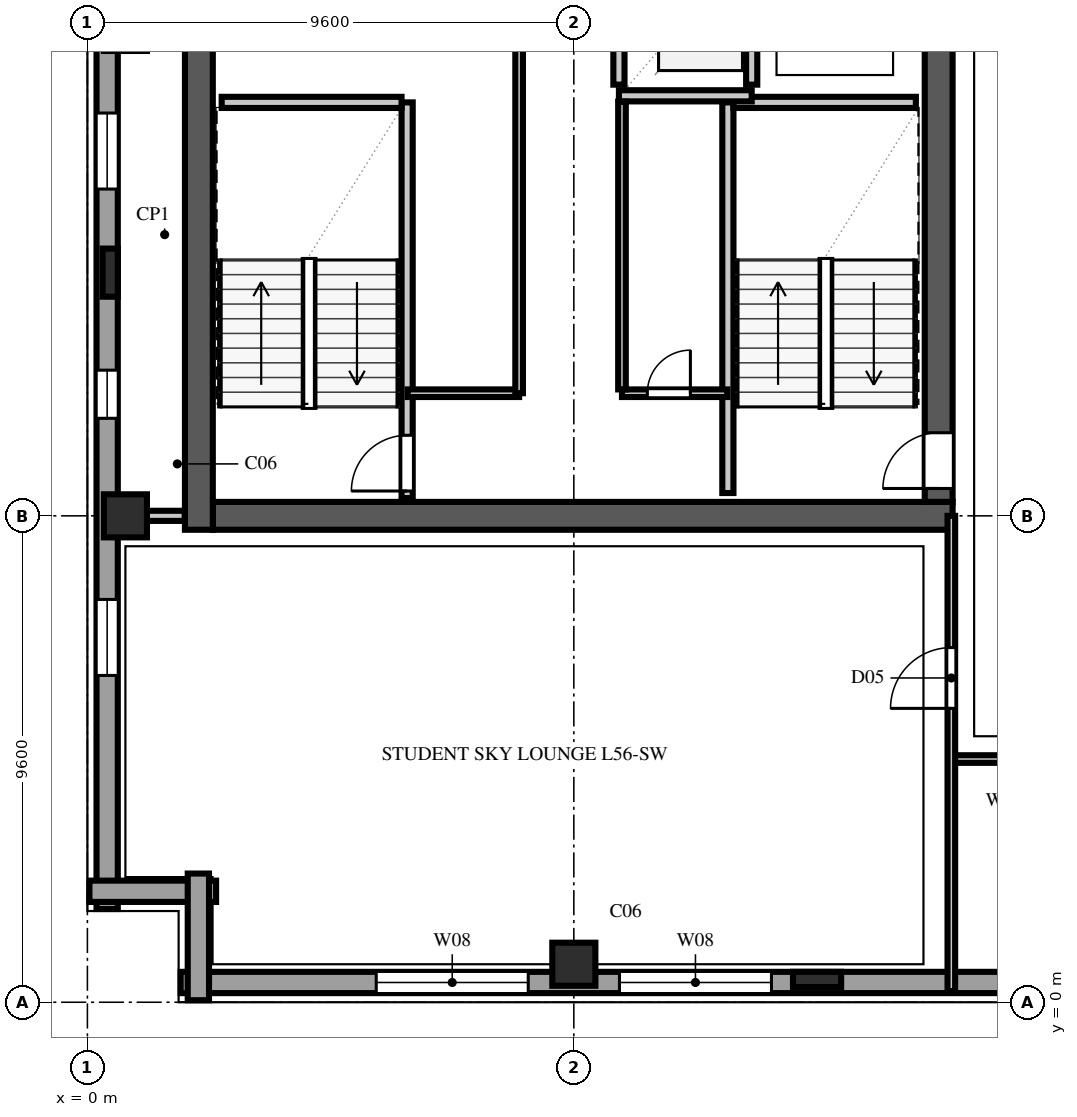
"""IFC4 building model, lengths in metres.
Left out: names, types, materials, properties, quantities, classifications, styles, units other than length and angle.
Written with IfcOpenShell. Run it as: python <this file> out.ifc"""

import sys

from ifc_helpers import new_model, si_unit, direction, frame, frame_2d, origin, origin_2d, place, context, subcontext, project, spatial, rectangle, extrude, element, fill, save


model = new_model("IFC4")
c1 = context("Model", 3, precision=1e-05, world=origin(), true_north=direction((0.0, 1.0)))
c2 = subcontext(c1, "Body", "Model", "MODEL_VIEW")
j1 = project(units=[si_unit("LENGTHUNIT", "METRE"), si_unit("PLANEANGLEUNIT", "RADIAN")], contexts=[c1])
p1 = place(None, origin())
s1 = spatial("IfcSite", under=j1, at=p1, CompositionType="ELEMENT")
p2 = place(p1, origin())
s2 = spatial("IfcBuilding", under=s1, at=p2, CompositionType="ELEMENT")
p3 = place(p2, frame((0.0, 0.0, 221.8)))
s3 = spatial("IfcBuildingStorey", under=s2, at=p3, CompositionType="ELEMENT", Elevation=221.8)
p4 = place(p3, frame((2.475, 9.6, 0.0), z_axis=(0.0, 0.0, 1.0), x_axis=(1.0, 0.0, 0.0)))
e1 = element("IfcWall", 1, at=p4, inside=s3, PredefinedType="SHEAR", context=c2, shape_type="SweptSolid", body=[
    extrude(rectangle(XDim=14.6, YDim=0.55, at=frame_2d((7.3, 0.0))), origin(), (0.0, 0.0, 1.0), 3.54),
])
p5 = place(p3, frame((2.2, 9.325, 0.0), z_axis=(0.0, 0.0, 1.0), x_axis=(0.0, 1.0, 0.0)))
e2 = element("IfcWall", 2, at=p5, inside=s3, PredefinedType="SHEAR", context=c2, shape_type="SweptSolid", body=[
    extrude(rectangle(XDim=38.95, YDim=0.55, at=frame_2d((19.475, 0.0))), origin(), (0.0, 0.0, 1.0), 3.54),
])
p6 = place(p3, frame((16.8, 9.875, 0.0), z_axis=(0.0, 0.0, 1.0), x_axis=(0.0, 1.0, 0.0)))
e3 = element("IfcWall", 3, at=p6, inside=s3, PredefinedType="SHEAR", context=c2, shape_type="SweptSolid", body=[
    extrude(rectangle(XDim=12.525, YDim=0.55, at=frame_2d((6.262, 0.0))), origin(), (0.0, 0.0, 1.0), 3.54),
])
p7 = place(p6, frame((0.265, 0.0, 0.0)))
e4 = element("IfcOpeningElement", 4, at=p7, cuts=e3, PredefinedType="OPENING", context=c2, shape_type="SweptSolid", body=[
    extrude(rectangle(XDim=1.1, YDim=2.2, at=frame_2d((0.55, 1.1))), frame((0.0, 0.287, 0.0), z_axis=(0.0, -1.0, 0.0), x_axis=(1.0, 0.0, 0.0)), (0.0, 0.0, 1.0), 0.574),
])
for number, where, z_axis, x_axis in (
    (5, (0.75, 9.6, 0.0), (0.0, 0.0, 1.0), (1.0, 0.0, 0.0)),
    (6, (9.6, 0.75, 0.0), (0.0, 0.0, 1.0), (1.0, 0.0, 0.0)),
):
    element("IfcColumn", number, at=place(p3, frame(where, z_axis=z_axis, x_axis=x_axis)), inside=s3, PredefinedType="COLUMN", context=c2, shape_type="SweptSolid", body=[
        extrude(rectangle(XDim=0.85, YDim=0.85, at=origin_2d()), origin(), (0.0, 0.0, 1.0), 3.8),
    ])
for number, where, z_axis, x_axis in (
    (7, (0.45, 14.4, 0.0), (0.0, 0.0, 1.0), (0.0, 1.0, 0.0)),
    (8, (14.4, 0.45, 0.0), (0.0, 0.0, 1.0), (1.0, 0.0, 0.0)),
):
    element("IfcColumn", number, at=place(p3, frame(where, z_axis=z_axis, x_axis=x_axis)), inside=s3, PredefinedType="PILASTER", context=c2, shape_type="SweptSolid", body=[
        extrude(rectangle(XDim=0.95, YDim=0.3, at=origin_2d()), origin(), (0.0, 0.0, 1.0), 3.8),
    ])
p8 = place(p3, frame((1.84, 0.39, 0.0), z_axis=(0.0, 0.0, 1.0), x_axis=(1.0, 0.0, 0.0)))
e9 = element("IfcWall", 9, at=p8, inside=s3, PredefinedType="SOLIDWALL", context=c2, shape_type="SweptSolid", body=[
    extrude(rectangle(XDim=53.92, YDim=0.42, at=frame_2d((26.96, 0.0))), origin(), (0.0, 0.0, 1.0), 3.54),
])
p9 = place(p8, frame((3.86, 0.0, 0.75)))
e10 = element("IfcOpeningElement", 10, at=p9, cuts=e9, PredefinedType="OPENING", context=c2, shape_type="SweptSolid", body=[
    extrude(rectangle(XDim=3.0, YDim=1.9, at=frame_2d((1.5, 0.95))), frame((0.0, 0.222, 0.0), z_axis=(0.0, -1.0, 0.0), x_axis=(1.0, 0.0, 0.0)), (0.0, 0.0, 1.0), 0.444),
])
p10 = place(p8, frame((8.66, 0.0, 0.75)))
e11 = element("IfcOpeningElement", 11, at=p10, cuts=e9, PredefinedType="OPENING", context=c2, shape_type="SweptSolid", body=[
    extrude(rectangle(XDim=3.0, YDim=1.9, at=frame_2d((1.5, 0.95))), frame((0.0, 0.222, 0.0), z_axis=(0.0, -1.0, 0.0), x_axis=(1.0, 0.0, 0.0)), (0.0, 0.0, 1.0), 0.444),
])
p11 = place(p8, frame((18.26, 0.0, 0.75)))
e12 = element("IfcOpeningElement", 12, at=p11, cuts=e9, PredefinedType="OPENING", context=c2, shape_type="SweptSolid", body=[
    extrude(rectangle(XDim=3.0, YDim=1.9, at=frame_2d((1.5, 0.95))), frame((0.0, 0.222, 0.0), z_axis=(0.0, -1.0, 0.0), x_axis=(1.0, 0.0, 0.0)), (0.0, 0.0, 1.0), 0.444),
])
p12 = place(p3, frame((0.39, 55.76, 0.0), z_axis=(0.0, 0.0, 1.0), x_axis=(0.0, -1.0, 0.0)))
e13 = element("IfcWall", 13, at=p12, inside=s3, PredefinedType="SOLIDWALL", context=c2, shape_type="SweptSolid", body=[
    extrude(rectangle(XDim=53.92, YDim=0.42, at=frame_2d((26.96, 0.0))), origin(), (0.0, 0.0, 1.0), 3.54),
])
p13 = place(p12, frame((4.885, 0.0, 0.9)))
e14 = element("IfcOpeningElement", 14, at=p13, cuts=e13, PredefinedType="OPENING", context=c2, shape_type="SweptSolid", body=[
    extrude(rectangle(XDim=0.95, YDim=1.85, at=frame_2d((0.475, 0.925))), frame((0.0, 0.222, 0.0), z_axis=(0.0, -1.0, 0.0), x_axis=(1.0, 0.0, 0.0)), (0.0, 0.0, 1.0), 0.444),
])
p14 = place(p12, frame((9.41, 0.0, 0.9)))
e15 = element("IfcOpeningElement", 15, at=p14, cuts=e13, PredefinedType="OPENING", context=c2, shape_type="SweptSolid", body=[
    extrude(rectangle(XDim=1.5, YDim=1.85, at=frame_2d((0.75, 0.925))), frame((0.0, 0.222, 0.0), z_axis=(0.0, -1.0, 0.0), x_axis=(1.0, 0.0, 0.0)), (0.0, 0.0, 1.0), 0.444),
])
p15 = place(p12, frame((14.485, 0.0, 0.9)))
e16 = element("IfcOpeningElement", 16, at=p15, cuts=e13, PredefinedType="OPENING", context=c2, shape_type="SweptSolid", body=[
    extrude(rectangle(XDim=0.95, YDim=1.85, at=frame_2d((0.475, 0.925))), frame((0.0, 0.222, 0.0), z_axis=(0.0, -1.0, 0.0), x_axis=(1.0, 0.0, 0.0)), (0.0, 0.0, 1.0), 0.444),
])
p16 = place(p12, frame((19.01, 0.0, 0.9)))
e17 = element("IfcOpeningElement", 17, at=p16, cuts=e13, PredefinedType="OPENING", context=c2, shape_type="SweptSolid", body=[
    extrude(rectangle(XDim=1.5, YDim=1.85, at=frame_2d((0.75, 0.925))), frame((0.0, 0.222, 0.0), z_axis=(0.0, -1.0, 0.0), x_axis=(1.0, 0.0, 0.0)), (0.0, 0.0, 1.0), 0.444),
])
p17 = place(p12, frame((24.085, 0.0, 0.9)))
e18 = element("IfcOpeningElement", 18, at=p17, cuts=e13, PredefinedType="OPENING", context=c2, shape_type="SweptSolid", body=[
    extrude(rectangle(XDim=0.95, YDim=1.85, at=frame_2d((0.475, 0.925))), frame((0.0, 0.222, 0.0), z_axis=(0.0, -1.0, 0.0), x_axis=(1.0, 0.0, 0.0)), (0.0, 0.0, 1.0), 0.444),
])
p18 = place(p12, frame((28.61, 0.0, 0.9)))
e19 = element("IfcOpeningElement", 19, at=p18, cuts=e13, PredefinedType="OPENING", context=c2, shape_type="SweptSolid", body=[
    extrude(rectangle(XDim=1.5, YDim=1.85, at=frame_2d((0.75, 0.925))), frame((0.0, 0.222, 0.0), z_axis=(0.0, -1.0, 0.0), x_axis=(1.0, 0.0, 0.0)), (0.0, 0.0, 1.0), 0.444),
])
p19 = place(p12, frame((33.685, 0.0, 0.9)))
e20 = element("IfcOpeningElement", 20, at=p19, cuts=e13, PredefinedType="OPENING", context=c2, shape_type="SweptSolid", body=[
    extrude(rectangle(XDim=0.95, YDim=1.85, at=frame_2d((0.475, 0.925))), frame((0.0, 0.222, 0.0), z_axis=(0.0, -1.0, 0.0), x_axis=(1.0, 0.0, 0.0)), (0.0, 0.0, 1.0), 0.444),
])
p20 = place(p12, frame((38.21, 0.0, 0.9)))
e21 = element("IfcOpeningElement", 21, at=p20, cuts=e13, PredefinedType="OPENING", context=c2, shape_type="SweptSolid", body=[
    extrude(rectangle(XDim=1.5, YDim=1.85, at=frame_2d((0.75, 0.925))), frame((0.0, 0.222, 0.0), z_axis=(0.0, -1.0, 0.0), x_axis=(1.0, 0.0, 0.0)), (0.0, 0.0, 1.0), 0.444),
])
p21 = place(p12, frame((43.285, 0.0, 0.9)))
e22 = element("IfcOpeningElement", 22, at=p21, cuts=e13, PredefinedType="OPENING", context=c2, shape_type="SweptSolid", body=[
    extrude(rectangle(XDim=0.95, YDim=1.85, at=frame_2d((0.475, 0.925))), frame((0.0, 0.222, 0.0), z_axis=(0.0, -1.0, 0.0), x_axis=(1.0, 0.0, 0.0)), (0.0, 0.0, 1.0), 0.444),
])
p22 = place(p12, frame((47.81, 0.0, 0.9)))
e23 = element("IfcOpeningElement", 23, at=p22, cuts=e13, PredefinedType="OPENING", context=c2, shape_type="SweptSolid", body=[
    extrude(rectangle(XDim=1.5, YDim=1.85, at=frame_2d((0.75, 0.925))), frame((0.0, 0.222, 0.0), z_axis=(0.0, -1.0, 0.0), x_axis=(1.0, 0.0, 0.0)), (0.0, 0.0, 1.0), 0.444),
])
for number, where, z_axis, x_axis in (
    (24, (0.04, 2.19, 0.0), (0.0, 0.0, 1.0), (1.0, 0.0, 0.0)),
    (25, (2.19, 2.54, 0.0), (0.0, 0.0, 1.0), (0.0, -1.0, 0.0)),
):
    element("IfcWall", number, at=place(p3, frame(where, z_axis=z_axis, x_axis=x_axis)), inside=s3, PredefinedType="SOLIDWALL", context=c2, shape_type="SweptSolid", body=[
        extrude(rectangle(XDim=2.5, YDim=0.42, at=frame_2d((1.25, 0.0))), origin(), (0.0, 0.0, 1.0), 3.54),
    ])
p23 = place(p3, frame((6.31, 9.95, 0.0), z_axis=(0.0, 0.0, 1.0), x_axis=(0.0, 1.0, 0.0)))
e26 = element("IfcWall", 26, at=p23, inside=s3, PredefinedType="SOLIDWALL", context=c2, shape_type="SweptSolid", body=[
    extrude(rectangle(XDim=7.81, YDim=0.22, at=frame_2d((3.905, 0.0))), origin(), (0.0, 0.0, 1.0), 3.54),
])
p24 = place(p23, frame((0.14, 0.0, 0.0)))
e27 = element("IfcOpeningElement", 27, at=p24, cuts=e26, PredefinedType="OPENING", context=c2, shape_type="SweptSolid", body=[
    extrude(rectangle(XDim=1.1, YDim=2.2, at=frame_2d((0.55, 1.1))), frame((0.0, 0.122, 0.0), z_axis=(0.0, -1.0, 0.0), x_axis=(1.0, 0.0, 0.0)), (0.0, 0.0, 1.0), 0.244),
])
p25 = place(p3, frame((2.65, 17.76, 0.0), z_axis=(0.0, 0.0, 1.0), x_axis=(1.0, 0.0, 0.0)))
e28 = element("IfcWall", 28, at=p25, inside=s3, PredefinedType="SOLIDWALL", context=c2, shape_type="SweptSolid", body=[
    extrude(rectangle(XDim=3.55, YDim=0.22, at=frame_2d((1.775, 0.0))), origin(), (0.0, 0.0, 1.0), 3.54),
])
p26 = place(p3, frame((12.64, 10.05, 0.0), z_axis=(0.0, 0.0, 1.0), x_axis=(0.0, 1.0, 0.0)))
e29 = element("IfcWall", 29, at=p26, inside=s3, PredefinedType="SOLIDWALL", context=c2, shape_type="SweptSolid", body=[
    extrude(rectangle(XDim=7.71, YDim=0.22, at=frame_2d((3.855, 0.0))), origin(), (0.0, 0.0, 1.0), 3.54),
])
p27 = place(p3, frame((12.75, 17.76, 0.0), z_axis=(0.0, 0.0, 1.0), x_axis=(1.0, 0.0, 0.0)))
e30 = element("IfcWall", 30, at=p27, inside=s3, PredefinedType="SOLIDWALL", context=c2, shape_type="SweptSolid", body=[
    extrude(rectangle(XDim=3.6, YDim=0.22, at=frame_2d((1.8, 0.0))), origin(), (0.0, 0.0, 1.0), 3.54),
])
p28 = place(p3, frame((10.49, 18.11, 0.0), z_axis=(0.0, 0.0, 1.0), x_axis=(0.0, 1.0, 0.0)))
e31 = element("IfcWall", 31, at=p28, inside=s3, PredefinedType="SOLIDWALL", context=c2, shape_type="SweptSolid", body=[
    extrude(rectangle(XDim=2.58, YDim=0.22, at=frame_2d((1.29, 0.0))), origin(), (0.0, 0.0, 1.0), 3.54),
])
p29 = place(p28, frame((0.74, 0.0, 0.0)))
e32 = element("IfcOpeningElement", 32, at=p29, cuts=e31, PredefinedType="OPENING", context=c2, shape_type="SweptSolid", body=[
    extrude(rectangle(XDim=1.1, YDim=2.2, at=frame_2d((0.55, 1.1))), frame((0.0, 0.122, 0.0), z_axis=(0.0, -1.0, 0.0), x_axis=(1.0, 0.0, 0.0)), (0.0, 0.0, 1.0), 0.244),
])
p30 = place(p3, frame((13.11, 18.11, 0.0), z_axis=(0.0, 0.0, 1.0), x_axis=(0.0, 1.0, 0.0)))
e33 = element("IfcWall", 33, at=p30, inside=s3, PredefinedType="SOLIDWALL", context=c2, shape_type="SweptSolid", body=[
    extrude(rectangle(XDim=2.58, YDim=0.22, at=frame_2d((1.29, 0.0))), origin(), (0.0, 0.0, 1.0), 3.54),
])
p31 = place(p3, frame((10.49, 17.89, 0.0), z_axis=(0.0, 0.0, 1.0), x_axis=(1.0, 0.0, 0.0)))
e34 = element("IfcWall", 34, at=p31, inside=s3, PredefinedType="SOLIDWALL", context=c2, shape_type="SweptSolid", body=[
    extrude(rectangle(XDim=2.62, YDim=0.22, at=frame_2d((1.31, 0.0))), origin(), (0.0, 0.0, 1.0), 3.54),
])
p32 = place(p3, frame((10.55, 12.02, 0.0), z_axis=(0.0, 0.0, 1.0), x_axis=(1.0, 0.0, 0.0)))
e35 = element("IfcWall", 35, at=p32, inside=s3, PredefinedType="PARTITIONING", context=c2, shape_type="SweptSolid", body=[
    extrude(rectangle(XDim=2.08, YDim=0.15, at=frame_2d((1.04, 0.0))), origin(), (0.0, 0.0, 1.0), 3.54),
])
p33 = place(p32, frame((0.5, 0.0, 0.0)))
e36 = element("IfcOpeningElement", 36, at=p33, cuts=e35, PredefinedType="OPENING", context=c2, shape_type="SweptSolid", body=[
    extrude(rectangle(XDim=0.85, YDim=2.1, at=frame_2d((0.425, 1.05))), frame((0.0, 0.087, 0.0), z_axis=(0.0, -1.0, 0.0), x_axis=(1.0, 0.0, 0.0)), (0.0, 0.0, 1.0), 0.174),
])
p34 = place(p3, frame((10.55, 12.095, 0.0), z_axis=(0.0, 0.0, 1.0), x_axis=(0.0, 1.0, 0.0)))
e37 = element("IfcWall", 37, at=p34, inside=s3, PredefinedType="PARTITIONING", context=c2, shape_type="SweptSolid", body=[
    extrude(rectangle(XDim=5.68, YDim=0.15, at=frame_2d((2.84, 0.0))), origin(), (0.0, 0.0, 1.0), 3.54),
])
p35 = place(p3, frame((6.32, 12.02, 0.0), z_axis=(0.0, 0.0, 1.0), x_axis=(1.0, 0.0, 0.0)))
e38 = element("IfcWall", 38, at=p35, inside=s3, PredefinedType="PARTITIONING", context=c2, shape_type="SweptSolid", body=[
    extrude(rectangle(XDim=2.2, YDim=0.15, at=frame_2d((1.1, 0.0))), origin(), (0.0, 0.0, 1.0), 3.54),
])
p36 = place(p3, frame((8.52, 12.02, 0.0), z_axis=(0.0, 0.0, 1.0), x_axis=(0.0, 1.0, 0.0)))
e39 = element("IfcWall", 39, at=p36, inside=s3, PredefinedType="PARTITIONING", context=c2, shape_type="SweptSolid", body=[
    extrude(rectangle(XDim=24.76, YDim=0.15, at=frame_2d((12.38, 0.0))), origin(), (0.0, 0.0, 1.0), 3.54),
])
p37 = place(p36, frame((8.0, 0.0, 0.0)))
e40 = element("IfcOpeningElement", 40, at=p37, cuts=e39, PredefinedType="OPENING", context=c2, shape_type="SweptSolid", body=[
    extrude(rectangle(XDim=0.95, YDim=2.15, at=frame_2d((0.475, 1.075))), frame((0.0, 0.087, 0.0), z_axis=(0.0, -1.0, 0.0), x_axis=(1.0, 0.0, 0.0)), (0.0, 0.0, 1.0), 0.174),
])
p38 = place(p36, frame((19.0, 0.0, 0.0)))
e41 = element("IfcOpeningElement", 41, at=p38, cuts=e39, PredefinedType="OPENING", context=c2, shape_type="SweptSolid", body=[
    extrude(rectangle(XDim=0.95, YDim=2.15, at=frame_2d((0.475, 1.075))), frame((0.0, 0.087, 0.0), z_axis=(0.0, -1.0, 0.0), x_axis=(1.0, 0.0, 0.0)), (0.0, 0.0, 1.0), 0.174),
])
p39 = place(p3, frame((0.85, 9.6, 0.0), z_axis=(0.0, 0.0, 1.0), x_axis=(1.0, 0.0, 0.0)))
e42 = element("IfcWall", 42, at=p39, inside=s3, PredefinedType="SOLIDWALL", context=c2, shape_type="SweptSolid", body=[
    extrude(rectangle(XDim=1.07, YDim=0.2, at=frame_2d((0.535, 0.0))), origin(), (0.0, 0.0, 1.0), 2.845),
])
p40 = place(p3, frame((17.05, 4.8, 0.0), z_axis=(0.0, 0.0, 1.0), x_axis=(1.0, 0.0, 0.0)))
e43 = element("IfcWall", 43, at=p40, inside=s3, PredefinedType="PARTITIONING", context=c2, shape_type="SweptSolid", body=[
    extrude(rectangle(XDim=2.15, YDim=0.15, at=frame_2d((1.075, 0.0))), origin(), (0.0, 0.0, 1.0), 3.54),
])
p41 = place(p3, frame((17.05, 0.22, 0.0), z_axis=(0.0, 0.0, 1.0), x_axis=(0.0, 1.0, 0.0)))
e44 = element("IfcWall", 44, at=p41, inside=s3, PredefinedType="PARTITIONING", context=c2, shape_type="SweptSolid", body=[
    extrude(rectangle(XDim=9.38, YDim=0.15, at=frame_2d((4.69, 0.0))), origin(), (0.0, 0.0, 1.0), 3.54),
])
p42 = place(p41, frame((5.58, 0.0, 0.0)))
e45 = element("IfcOpeningElement", 45, at=p42, cuts=e44, PredefinedType="OPENING", context=c2, shape_type="SweptSolid", body=[
    extrude(rectangle(XDim=1.2, YDim=2.2, at=frame_2d((0.6, 1.1))), frame((0.0, 0.087, 0.0), z_axis=(0.0, -1.0, 0.0), x_axis=(1.0, 0.0, 0.0)), (0.0, 0.0, 1.0), 0.174),
])
p43 = place(p9, origin())
e46 = element("IfcWindow", 46, at=p43, inside=s3, PartitioningType="TRIPLE_PANEL_VERTICAL", PredefinedType="WINDOW", context=c2, shape_type="SweptSolid", body=[
    extrude(rectangle(XDim=3.0, YDim=1.9, at=frame_2d((1.5, 0.95))), frame((0.0, 0.11, 0.0), z_axis=(0.0, -1.0, 0.0), x_axis=(1.0, 0.0, 0.0)), (0.0, 0.0, 1.0), 0.06),
])
fill(e10, e46)
p44 = place(p10, origin())
e47 = element("IfcWindow", 47, at=p44, inside=s3, PartitioningType="TRIPLE_PANEL_VERTICAL", PredefinedType="WINDOW", context=c2, shape_type="SweptSolid", body=[
    extrude(rectangle(XDim=3.0, YDim=1.9, at=frame_2d((1.5, 0.95))), frame((0.0, 0.11, 0.0), z_axis=(0.0, -1.0, 0.0), x_axis=(1.0, 0.0, 0.0)), (0.0, 0.0, 1.0), 0.06),
])
fill(e11, e47)
p45 = place(p20, origin())
e48 = element("IfcWindow", 48, at=p45, inside=s3, PartitioningType="DOUBLE_PANEL_VERTICAL", PredefinedType="WINDOW", context=c2, shape_type="SweptSolid", body=[
    extrude(rectangle(XDim=1.5, YDim=1.85, at=frame_2d((0.75, 0.925))), frame((0.0, 0.11, 0.0), z_axis=(0.0, -1.0, 0.0), x_axis=(1.0, 0.0, 0.0)), (0.0, 0.0, 1.0), 0.06),
])
fill(e21, e48)
p46 = place(p21, origin())
e49 = element("IfcWindow", 49, at=p46, inside=s3, PartitioningType="SINGLE_PANEL", PredefinedType="WINDOW", context=c2, shape_type="SweptSolid", body=[
    extrude(rectangle(XDim=0.95, YDim=1.85, at=frame_2d((0.475, 0.925))), frame((0.0, 0.11, 0.0), z_axis=(0.0, -1.0, 0.0), x_axis=(1.0, 0.0, 0.0)), (0.0, 0.0, 1.0), 0.06),
])
fill(e22, e49)
p47 = place(p22, origin())
e50 = element("IfcWindow", 50, at=p47, inside=s3, PartitioningType="DOUBLE_PANEL_VERTICAL", PredefinedType="WINDOW", context=c2, shape_type="SweptSolid", body=[
    extrude(rectangle(XDim=1.5, YDim=1.85, at=frame_2d((0.75, 0.925))), frame((0.0, 0.11, 0.0), z_axis=(0.0, -1.0, 0.0), x_axis=(1.0, 0.0, 0.0)), (0.0, 0.0, 1.0), 0.06),
])
fill(e23, e50)
p48 = place(p24, origin())
e51 = element("IfcDoor", 51, at=p48, inside=s3, OperationType="SINGLE_SWING_LEFT", PredefinedType="DOOR", context=c2, shape_type="SweptSolid", body=[
    extrude(rectangle(XDim=1.1, YDim=2.2, at=frame_2d((0.55, 1.1))), frame((0.0, 0.025, 0.0), z_axis=(0.0, -1.0, 0.0), x_axis=(1.0, 0.0, 0.0)), (0.0, 0.0, 1.0), 0.05),
])
fill(e27, e51)
p49 = place(p7, origin())
e52 = element("IfcDoor", 52, at=p49, inside=s3, OperationType="SINGLE_SWING_LEFT", PredefinedType="DOOR", context=c2, shape_type="SweptSolid", body=[
    extrude(rectangle(XDim=1.1, YDim=2.2, at=frame_2d((0.55, 1.1))), frame((0.0, 0.025, 0.0), z_axis=(0.0, -1.0, 0.0), x_axis=(1.0, 0.0, 0.0)), (0.0, 0.0, 1.0), 0.05),
])
fill(e4, e52)
p50 = place(p33, origin())
e53 = element("IfcDoor", 53, at=p50, inside=s3, OperationType="SINGLE_SWING_RIGHT", PredefinedType="DOOR", context=c2, shape_type="SweptSolid", body=[
    extrude(rectangle(XDim=0.85, YDim=2.1, at=frame_2d((0.425, 1.05))), frame((0.0, 0.025, 0.0), z_axis=(0.0, -1.0, 0.0), x_axis=(1.0, 0.0, 0.0)), (0.0, 0.0, 1.0), 0.05),
])
fill(e36, e53)
p51 = place(p42, origin())
e54 = element("IfcDoor", 54, at=p51, inside=s3, OperationType="SINGLE_SWING_LEFT", PredefinedType="DOOR", context=c2, shape_type="SweptSolid", body=[
    extrude(rectangle(XDim=1.2, YDim=2.2, at=frame_2d((0.6, 1.1))), frame((0.0, 0.025, 0.0), z_axis=(0.0, -1.0, 0.0), x_axis=(1.0, 0.0, 0.0)), (0.0, 0.0, 1.0), 0.05),
])
fill(e45, e54)
save(model, sys.argv[1])
